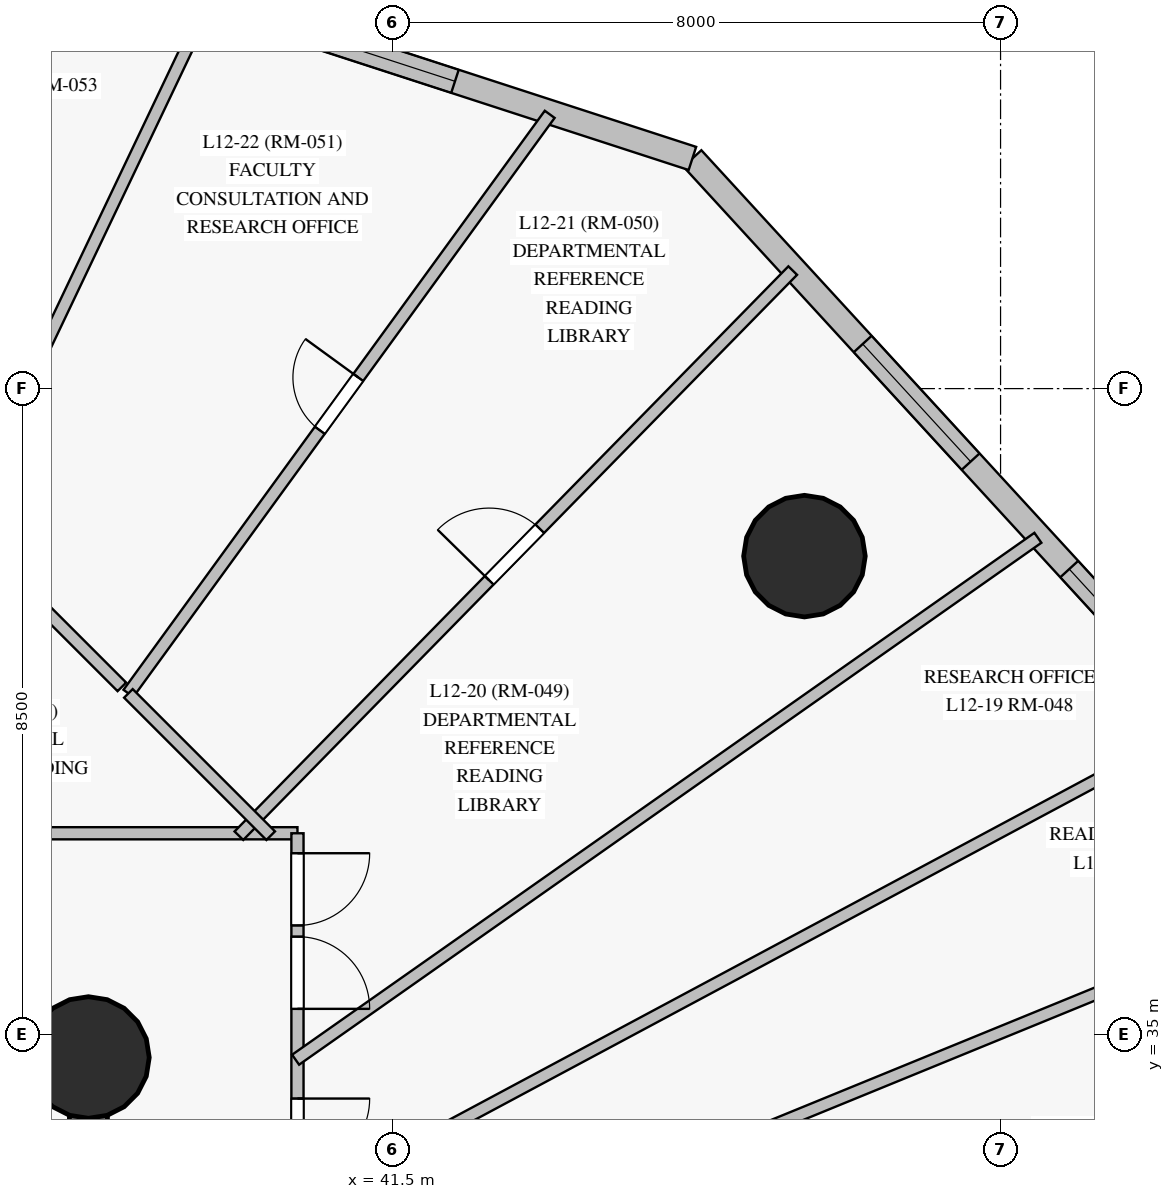
"""IFC4 building model, lengths in metres.
Left out: names, types, materials, properties, quantities, classifications, styles, units other than length and angle.
Written with IfcOpenShell. Run it as: python <this file> out.ifc"""

import sys

from ifc_helpers import new_model, si_unit, direction, frame, frame_2d, origin, origin_with_axes, origin_2d, place, context, subcontext, project, spatial, rectangle, circle, extrude, source, transform, mapped, element, fill, save


model = new_model("IFC4")
c1 = context("Model", 3, precision=1e-05, world=origin(), true_north=direction((0.0, 1.0)))
c2 = subcontext(c1, "Body", "Model", "MODEL_VIEW")
j1 = project(units=[si_unit("LENGTHUNIT", "METRE"), si_unit("PLANEANGLEUNIT", "RADIAN")], contexts=[c1])
p1 = place(None, origin())
s1 = spatial("IfcSite", under=j1, at=p1, CompositionType="ELEMENT")
p2 = place(p1, origin())
s2 = spatial("IfcBuilding", under=s1, at=p2, CompositionType="ELEMENT")
p3 = place(p2, frame((0.0, 0.0, 48.1)))
s3 = spatial("IfcBuildingStorey", under=s2, at=p3, CompositionType="ELEMENT", Elevation=48.1)
p4 = place(p3, frame((37.5, 18.3, 0.0), z_axis=(0.0, 0.0, 1.0), x_axis=(0.0, 1.0, 0.0)))
e1 = element("IfcWall", 1, at=p4, inside=s3, PredefinedType="SHEAR", context=c2, shape_type="SweptSolid", body=[
    extrude(rectangle(XDim=16.4, YDim=0.5, at=frame_2d((8.2, 0.0))), origin(), (0.0, 0.0, 1.0), 3.35),
])
p5 = place(p4, frame((14.06, 0.0, 0.0)))
e2 = element("IfcOpeningElement", 2, at=p5, cuts=e1, PredefinedType="OPENING", context=c2, shape_type="SweptSolid", body=[
    extrude(rectangle(XDim=1.2, YDim=2.15, at=frame_2d((0.6, 1.075))), frame((0.0, 0.26, 0.0), z_axis=(0.0, -1.0, 0.0), x_axis=(1.0, 0.0, 0.0)), (0.0, 0.0, 1.0), 0.52),
])
p6 = place(p3, frame((37.5, 34.7, 0.0), z_axis=(0.0, 0.0, 1.0), x_axis=(-1.0, 0.0, 0.0)))
e3 = element("IfcWall", 3, at=p6, inside=s3, PredefinedType="SHEAR", context=c2, shape_type="SweptSolid", body=[
    extrude(rectangle(XDim=10.95, YDim=0.5, at=frame_2d((5.475, 0.0))), origin(), (0.0, 0.0, 1.0), 3.35),
])
p7 = place(p6, frame((2.15, 0.0, 0.0)))
e4 = element("IfcOpeningElement", 4, at=p7, cuts=e3, PredefinedType="OPENING", context=c2, shape_type="SweptSolid", body=[
    extrude(rectangle(XDim=1.2, YDim=2.15, at=frame_2d((0.6, 1.075))), frame((0.0, 0.26, 0.0), z_axis=(0.0, -1.0, 0.0), x_axis=(1.0, 0.0, 0.0)), (0.0, 0.0, 1.0), 0.52),
])
p8 = place(p6, frame((6.35, 0.0, 0.0)))
e5 = element("IfcOpeningElement", 5, at=p8, cuts=e3, PredefinedType="OPENING", context=c2, shape_type="SweptSolid", body=[
    extrude(rectangle(XDim=1.1, YDim=2.15, at=frame_2d((0.55, 1.075))), frame((0.0, 0.26, 0.0), z_axis=(0.0, -1.0, 0.0), x_axis=(1.0, 0.0, 0.0)), (0.0, 0.0, 1.0), 0.52),
])
m1 = source(origin_with_axes(), c2, "Body", "SweptSolid", [
    extrude(circle(Radius=0.8, at=origin_2d()), origin(), (0.0, 0.0, 1.0), 3.6),
])
for number, where, z_axis, x_axis in (
    (6, (37.5, 34.7, 0.0), (0.0, 0.0, 1.0), (1.0, 0.0, 0.0)),
    (7, (46.92, 41.296, 0.0), (0.0, 0.0, 1.0), (1.0, 0.0, 0.0)),
):
    element("IfcColumn", number, at=place(p3, frame(where, z_axis=z_axis, x_axis=x_axis)), inside=s3, PredefinedType="COLUMN", context=c2, shape_type="MappedRepresentation", body=[
        mapped(m1, transform((0.0, 0.0, 0.0), scale=1.0)),
    ])
p9 = place(p3, frame((54.252, 36.932, 0.0), z_axis=(0.0, 0.0, 1.0), x_axis=(-0.676154884731, 0.736759507474, 0.0)))
e8 = element("IfcWall", 8, at=p9, inside=s3, PredefinedType="SOLIDWALL", context=c2, shape_type="SweptSolid", body=[
    extrude(rectangle(XDim=13.024, YDim=0.32, at=frame_2d((6.512, 0.0))), origin(), (0.0, 0.0, 1.0), 3.35),
])
p10 = place(p9, frame((0.633, 0.0, 0.85)))
e9 = element("IfcOpeningElement", 9, at=p10, cuts=e8, PredefinedType="OPENING", context=c2, shape_type="SweptSolid", body=[
    extrude(rectangle(XDim=1.8, YDim=1.85, at=frame_2d((0.9, 0.925))), frame((0.0, 0.17, 0.0), z_axis=(0.0, -1.0, 0.0), x_axis=(1.0, 0.0, 0.0)), (0.0, 0.0, 1.0), 0.34),
])
p11 = place(p9, frame((3.592, 0.0, 0.85)))
e10 = element("IfcOpeningElement", 10, at=p11, cuts=e8, PredefinedType="OPENING", context=c2, shape_type="SweptSolid", body=[
    extrude(rectangle(XDim=2.1, YDim=1.95, at=frame_2d((1.05, 0.975))), frame((0.0, 0.17, 0.0), z_axis=(0.0, -1.0, 0.0), x_axis=(1.0, 0.0, 0.0)), (0.0, 0.0, 1.0), 0.34),
])
p12 = place(p9, frame((7.611, 0.0, 0.85)))
e11 = element("IfcOpeningElement", 11, at=p12, cuts=e8, PredefinedType="OPENING", context=c2, shape_type="SweptSolid", body=[
    extrude(rectangle(XDim=2.1, YDim=1.95, at=frame_2d((1.05, 0.975))), frame((0.0, 0.17, 0.0), z_axis=(0.0, -1.0, 0.0), x_axis=(1.0, 0.0, 0.0)), (0.0, 0.0, 1.0), 0.34),
])
p13 = place(p3, frame((45.446, 46.528, 0.0), z_axis=(0.0, 0.0, 1.0), x_axis=(-0.951047758386, 0.309043947148, 0.0)))
e12 = element("IfcWall", 12, at=p13, inside=s3, PredefinedType="SOLIDWALL", context=c2, shape_type="SweptSolid", body=[
    extrude(rectangle(XDim=10.484, YDim=0.32, at=frame_2d((5.242, 0.0))), origin(), (0.0, 0.0, 1.0), 3.35),
])
p14 = place(p13, frame((3.284, 0.0, 0.85)))
e13 = element("IfcOpeningElement", 13, at=p14, cuts=e12, PredefinedType="OPENING", context=c2, shape_type="SweptSolid", body=[
    extrude(rectangle(XDim=2.1, YDim=1.95, at=frame_2d((1.05, 0.975))), frame((0.0, 0.17, 0.0), z_axis=(0.0, -1.0, 0.0), x_axis=(1.0, 0.0, 0.0)), (0.0, 0.0, 1.0), 0.34),
])
p15 = place(p13, frame((7.302, 0.0, 0.85)))
e14 = element("IfcOpeningElement", 14, at=p15, cuts=e12, PredefinedType="OPENING", context=c2, shape_type="SweptSolid", body=[
    extrude(rectangle(XDim=2.1, YDim=1.95, at=frame_2d((1.05, 0.975))), frame((0.0, 0.17, 0.0), z_axis=(0.0, -1.0, 0.0), x_axis=(1.0, 0.0, 0.0)), (0.0, 0.0, 1.0), 0.34),
])
p16 = place(p3, frame((10.5, 37.65, 0.0), z_axis=(0.0, 0.0, 1.0), x_axis=(1.0, 0.0, 0.0)))
e15 = element("IfcWall", 15, at=p16, inside=s3, PredefinedType="PARTITIONING", context=c2, shape_type="SweptSolid", body=[
    extrude(rectangle(XDim=29.75, YDim=0.16, at=frame_2d((14.875, 0.0))), origin(), (0.0, 0.0, 1.0), 2.75),
])
p17 = place(p16, frame((21.927, 0.0, 0.0)))
e16 = element("IfcOpeningElement", 16, at=p17, cuts=e15, PredefinedType="OPENING", context=c2, shape_type="SweptSolid", body=[
    extrude(rectangle(XDim=0.95, YDim=2.15, at=frame_2d((0.475, 1.075))), frame((0.0, 0.09, 0.0), z_axis=(0.0, -1.0, 0.0), x_axis=(1.0, 0.0, 0.0)), (0.0, 0.0, 1.0), 0.18),
])
p18 = place(p16, frame((20.262, 0.0, 0.0)))
e17 = element("IfcOpeningElement", 17, at=p18, cuts=e15, PredefinedType="OPENING", context=c2, shape_type="SweptSolid", body=[
    extrude(rectangle(XDim=0.95, YDim=2.15, at=frame_2d((0.475, 1.075))), frame((0.0, 0.09, 0.0), z_axis=(0.0, -1.0, 0.0), x_axis=(1.0, 0.0, 0.0)), (0.0, 0.0, 1.0), 0.18),
])
p19 = place(p16, frame((18.722, 0.0, 0.0)))
e18 = element("IfcOpeningElement", 18, at=p19, cuts=e15, PredefinedType="OPENING", context=c2, shape_type="SweptSolid", body=[
    extrude(rectangle(XDim=0.95, YDim=2.15, at=frame_2d((0.475, 1.075))), frame((0.0, 0.09, 0.0), z_axis=(0.0, -1.0, 0.0), x_axis=(1.0, 0.0, 0.0)), (0.0, 0.0, 1.0), 0.18),
])
p20 = place(p16, frame((14.4, 0.0, 0.0)))
e19 = element("IfcOpeningElement", 19, at=p20, cuts=e15, PredefinedType="OPENING", context=c2, shape_type="SweptSolid", body=[
    extrude(rectangle(XDim=0.95, YDim=2.15, at=frame_2d((0.475, 1.075))), frame((0.0, 0.09, 0.0), z_axis=(0.0, -1.0, 0.0), x_axis=(1.0, 0.0, 0.0)), (0.0, 0.0, 1.0), 0.18),
])
p21 = place(p16, frame((6.962, 0.0, 0.0)))
e20 = element("IfcOpeningElement", 20, at=p21, cuts=e15, PredefinedType="OPENING", context=c2, shape_type="SweptSolid", body=[
    extrude(rectangle(XDim=0.95, YDim=2.15, at=frame_2d((0.475, 1.075))), frame((0.0, 0.09, 0.0), z_axis=(0.0, -1.0, 0.0), x_axis=(1.0, 0.0, 0.0)), (0.0, 0.0, 1.0), 0.18),
])
p22 = place(p3, frame((40.25, 37.65, 0.0), z_axis=(0.0, 0.0, 1.0), x_axis=(0.0, -1.0, 0.0)))
e21 = element("IfcWall", 21, at=p22, inside=s3, PredefinedType="PARTITIONING", context=c2, shape_type="SweptSolid", body=[
    extrude(rectangle(XDim=22.3, YDim=0.16, at=frame_2d((11.15, 0.0))), origin(), (0.0, 0.0, 1.0), 2.75),
])
p23 = place(p22, frame((14.02, 0.0, 0.0)))
e22 = element("IfcOpeningElement", 22, at=p23, cuts=e21, PredefinedType="OPENING", context=c2, shape_type="SweptSolid", body=[
    extrude(rectangle(XDim=0.95, YDim=2.15, at=frame_2d((0.475, 1.075))), frame((0.0, 0.09, 0.0), z_axis=(0.0, -1.0, 0.0), x_axis=(1.0, 0.0, 0.0)), (0.0, 0.0, 1.0), 0.18),
])
p24 = place(p22, frame((10.915, 0.0, 0.0)))
e23 = element("IfcOpeningElement", 23, at=p24, cuts=e21, PredefinedType="OPENING", context=c2, shape_type="SweptSolid", body=[
    extrude(rectangle(XDim=0.95, YDim=2.15, at=frame_2d((0.475, 1.075))), frame((0.0, 0.09, 0.0), z_axis=(0.0, -1.0, 0.0), x_axis=(1.0, 0.0, 0.0)), (0.0, 0.0, 1.0), 0.18),
])
p25 = place(p22, frame((7.051, 0.0, 0.0)))
e24 = element("IfcOpeningElement", 24, at=p25, cuts=e21, PredefinedType="OPENING", context=c2, shape_type="SweptSolid", body=[
    extrude(rectangle(XDim=0.86, YDim=2.1, at=frame_2d((0.43, 1.05))), frame((0.0, 0.09, 0.0), z_axis=(0.0, -1.0, 0.0), x_axis=(1.0, 0.0, 0.0)), (0.0, 0.0, 1.0), 0.18),
])
p26 = place(p22, frame((3.49, 0.0, 0.0)))
e25 = element("IfcOpeningElement", 25, at=p26, cuts=e21, PredefinedType="OPENING", context=c2, shape_type="SweptSolid", body=[
    extrude(rectangle(XDim=0.95, YDim=2.15, at=frame_2d((0.475, 1.075))), frame((0.0, 0.09, 0.0), z_axis=(0.0, -1.0, 0.0), x_axis=(1.0, 0.0, 0.0)), (0.0, 0.0, 1.0), 0.18),
])
p27 = place(p22, frame((1.36, 0.0, 0.0)))
e26 = element("IfcOpeningElement", 26, at=p27, cuts=e21, PredefinedType="OPENING", context=c2, shape_type="SweptSolid", body=[
    extrude(rectangle(XDim=0.95, YDim=2.15, at=frame_2d((0.475, 1.075))), frame((0.0, 0.09, 0.0), z_axis=(0.0, -1.0, 0.0), x_axis=(1.0, 0.0, 0.0)), (0.0, 0.0, 1.0), 0.18),
])
p28 = place(p22, frame((0.263, 0.0, 0.0)))
e27 = element("IfcOpeningElement", 27, at=p28, cuts=e21, PredefinedType="OPENING", context=c2, shape_type="SweptSolid", body=[
    extrude(rectangle(XDim=0.95, YDim=2.15, at=frame_2d((0.475, 1.075))), frame((0.0, 0.09, 0.0), z_axis=(0.0, -1.0, 0.0), x_axis=(1.0, 0.0, 0.0)), (0.0, 0.0, 1.0), 0.18),
])
p29 = place(p22, frame((15.155, 0.0, 0.0)))
e28 = element("IfcOpeningElement", 28, at=p29, cuts=e21, PredefinedType="OPENING", context=c2, shape_type="SweptSolid", body=[
    extrude(rectangle(XDim=0.95, YDim=2.15, at=frame_2d((0.475, 1.075))), frame((0.0, 0.09, 0.0), z_axis=(0.0, -1.0, 0.0), x_axis=(1.0, 0.0, 0.0)), (0.0, 0.0, 1.0), 0.18),
])
p30 = place(p22, frame((5.17, 0.0, 0.0)))
e29 = element("IfcOpeningElement", 29, at=p30, cuts=e21, PredefinedType="OPENING", context=c2, shape_type="SweptSolid", body=[
    extrude(rectangle(XDim=0.86, YDim=2.04, at=frame_2d((0.43, 1.02))), frame((0.0, 0.09, 0.0), z_axis=(0.0, -1.0, 0.0), x_axis=(1.0, 0.0, 0.0)), (0.0, 0.0, 1.0), 0.18),
])
p31 = place(p3, frame((40.208, 31.226, 0.0), z_axis=(0.0, 0.0, 1.0), x_axis=(0.925535120156, 0.378661776995, 0.0)))
e30 = element("IfcWall", 30, at=p31, inside=s3, PredefinedType="PARTITIONING", context=c2, shape_type="SweptSolid", body=[
    extrude(rectangle(XDim=15.115, YDim=0.16, at=frame_2d((7.557, 0.0))), origin(), (0.0, 0.0, 1.0), 3.35),
])
p32 = place(p3, frame((40.224, 32.708, 0.0), z_axis=(0.0, 0.0, 1.0), x_axis=(0.881639877006, 0.471922798001, 0.0)))
e31 = element("IfcWall", 31, at=p32, inside=s3, PredefinedType="PARTITIONING", context=c2, shape_type="SweptSolid", body=[
    extrude(rectangle(XDim=13.591, YDim=0.16, at=frame_2d((6.796, 0.0))), origin(), (0.0, 0.0, 1.0), 3.35),
])
p33 = place(p3, frame((40.226, 34.671, 0.0), z_axis=(0.0, 0.0, 1.0), x_axis=(0.818038780685, 0.5751630667, 0.0)))
e32 = element("IfcWall", 32, at=p33, inside=s3, PredefinedType="PARTITIONING", context=c2, shape_type="SweptSolid", body=[
    extrude(rectangle(XDim=11.938, YDim=0.16, at=frame_2d((5.969, 0.0))), origin(), (0.0, 0.0, 1.0), 3.35),
])
p34 = place(p3, frame((39.479, 37.618, 0.0), z_axis=(0.0, 0.0, 1.0), x_axis=(0.699941263182, 0.714200411716, 0.0)))
e33 = element("IfcWall", 33, at=p34, inside=s3, PredefinedType="PARTITIONING", context=c2, shape_type="SweptSolid", body=[
    extrude(rectangle(XDim=10.41, YDim=0.16, at=frame_2d((5.205, 0.0))), origin(), (0.0, 0.0, 1.0), 3.35),
])
p35 = place(p34, frame((4.705, 0.0, 0.0)))
e34 = element("IfcOpeningElement", 34, at=p35, cuts=e33, PredefinedType="OPENING", context=c2, shape_type="SweptSolid", body=[
    extrude(rectangle(XDim=0.95, YDim=2.15, at=frame_2d((0.475, 1.075))), frame((0.0, 0.09, 0.0), z_axis=(0.0, -1.0, 0.0), x_axis=(1.0, 0.0, 0.0)), (0.0, 0.0, 1.0), 0.18),
])
p36 = place(p3, frame((38.026, 39.49, 0.0), z_axis=(0.0, 0.0, 1.0), x_axis=(0.588344255405, 0.808610559622, 0.0)))
e35 = element("IfcWall", 35, at=p36, inside=s3, PredefinedType="PARTITIONING", context=c2, shape_type="SweptSolid", body=[
    extrude(rectangle(XDim=9.421, YDim=0.16, at=frame_2d((4.711, 0.0))), origin(), (0.0, 0.0, 1.0), 3.35),
])
p37 = place(p36, frame((4.281, 0.0, 0.0)))
e36 = element("IfcOpeningElement", 36, at=p37, cuts=e35, PredefinedType="OPENING", context=c2, shape_type="SweptSolid", body=[
    extrude(rectangle(XDim=0.86, YDim=2.04, at=frame_2d((0.43, 1.02))), frame((0.0, 0.09, 0.0), z_axis=(0.0, -1.0, 0.0), x_axis=(1.0, 0.0, 0.0)), (0.0, 0.0, 1.0), 0.18),
])
p38 = place(p3, frame((35.52, 41.102, 0.0), z_axis=(0.0, 0.0, 1.0), x_axis=(0.429966802058, 0.902844698233, 0.0)))
e37 = element("IfcWall", 37, at=p38, inside=s3, PredefinedType="PARTITIONING", context=c2, shape_type="SweptSolid", body=[
    extrude(rectangle(XDim=8.272, YDim=0.16, at=frame_2d((4.136, 0.0))), origin(), (0.0, 0.0, 1.0), 3.35),
])
p39 = place(p3, frame((39.898, 37.618, 0.0), z_axis=(0.0, 0.0, 1.0), x_axis=(-0.707106781187, 0.707106781187, 0.0)))
e38 = element("IfcWall", 38, at=p39, inside=s3, PredefinedType="PARTITIONING", context=c2, shape_type="SweptSolid", body=[
    extrude(rectangle(XDim=2.647, YDim=0.16, at=frame_2d((1.324, 0.0))), origin(), (0.0, 0.0, 1.0), 2.75),
])
p40 = place(p3, frame((37.94, 39.576, 0.0), z_axis=(0.0, 0.0, 1.0), x_axis=(-0.707034748713, 0.707178806323, 0.0)))
e39 = element("IfcWall", 39, at=p40, inside=s3, PredefinedType="PARTITIONING", context=c2, shape_type="SweptSolid", body=[
    extrude(rectangle(XDim=1.695, YDim=0.16, at=frame_2d((0.847, 0.0))), origin(), (0.0, 0.0, 1.0), 2.75),
])
m2 = source(origin_with_axes(), c2, "Body", "SweptSolid", [
    extrude(rectangle(XDim=2.1, YDim=1.95, at=frame_2d((1.05, 0.975))), frame((0.0, 0.03, 0.0), z_axis=(0.0, -1.0, 0.0), x_axis=(1.0, 0.0, 0.0)), (0.0, 0.0, 1.0), 0.06),
])
p41 = place(p11, origin())
e40 = element("IfcWindow", 40, at=p41, inside=s3, PartitioningType="SINGLE_PANEL", PredefinedType="WINDOW", context=c2, shape_type="MappedRepresentation", body=[
    mapped(m2, transform((0.0, 0.0, 0.0), scale=1.0)),
])
fill(e10, e40)
p42 = place(p12, origin())
e41 = element("IfcWindow", 41, at=p42, inside=s3, PartitioningType="SINGLE_PANEL", PredefinedType="WINDOW", context=c2, shape_type="MappedRepresentation", body=[
    mapped(m2, transform((0.0, 0.0, 0.0), scale=1.0)),
])
fill(e11, e41)
p43 = place(p14, origin())
e42 = element("IfcWindow", 42, at=p43, inside=s3, PartitioningType="SINGLE_PANEL", PredefinedType="WINDOW", context=c2, shape_type="MappedRepresentation", body=[
    mapped(m2, transform((0.0, 0.0, 0.0), scale=1.0)),
])
fill(e13, e42)
m3 = source(origin_with_axes(), c2, "Body", "SweptSolid", [
    extrude(rectangle(XDim=0.95, YDim=2.15, at=frame_2d((0.475, 1.075))), frame((0.0, 0.025, 0.0), z_axis=(0.0, -1.0, 0.0), x_axis=(1.0, 0.0, 0.0)), (0.0, 0.0, 1.0), 0.05),
])
p44 = place(p26, origin())
e43 = element("IfcDoor", 43, at=p44, inside=s3, OperationType="SINGLE_SWING_LEFT", PredefinedType="DOOR", context=c2, shape_type="MappedRepresentation", body=[
    mapped(m3, transform((0.0, 0.0, 0.0), scale=1.0)),
])
fill(e25, e43)
p45 = place(p27, origin())
e44 = element("IfcDoor", 44, at=p45, inside=s3, OperationType="SINGLE_SWING_RIGHT", PredefinedType="DOOR", context=c2, shape_type="MappedRepresentation", body=[
    mapped(m3, transform((0.0, 0.0, 0.0), scale=1.0)),
])
fill(e26, e44)
p46 = place(p28, origin())
e45 = element("IfcDoor", 45, at=p46, inside=s3, OperationType="SINGLE_SWING_LEFT", PredefinedType="DOOR", context=c2, shape_type="MappedRepresentation", body=[
    mapped(m3, transform((0.0, 0.0, 0.0), scale=1.0)),
])
fill(e27, e45)
p47 = place(p35, origin())
e46 = element("IfcDoor", 46, at=p47, inside=s3, OperationType="SINGLE_SWING_LEFT", PredefinedType="DOOR", context=c2, shape_type="MappedRepresentation", body=[
    mapped(m3, transform((0.0, 0.0, 0.0), scale=1.0)),
])
fill(e34, e46)
m4 = source(origin_with_axes(), c2, "Body", "SweptSolid", [
    extrude(rectangle(XDim=0.86, YDim=2.04, at=frame_2d((0.43, 1.02))), frame((0.0, 0.025, 0.0), z_axis=(0.0, -1.0, 0.0), x_axis=(1.0, 0.0, 0.0)), (0.0, 0.0, 1.0), 0.05),
])
p48 = place(p37, origin())
e47 = element("IfcDoor", 47, at=p48, inside=s3, OperationType="SINGLE_SWING_RIGHT", PredefinedType="DOOR", context=c2, shape_type="MappedRepresentation", body=[
    mapped(m4, transform((0.0, 0.0, 0.0), scale=1.0)),
])
fill(e36, e47)
save(model, sys.argv[1])
